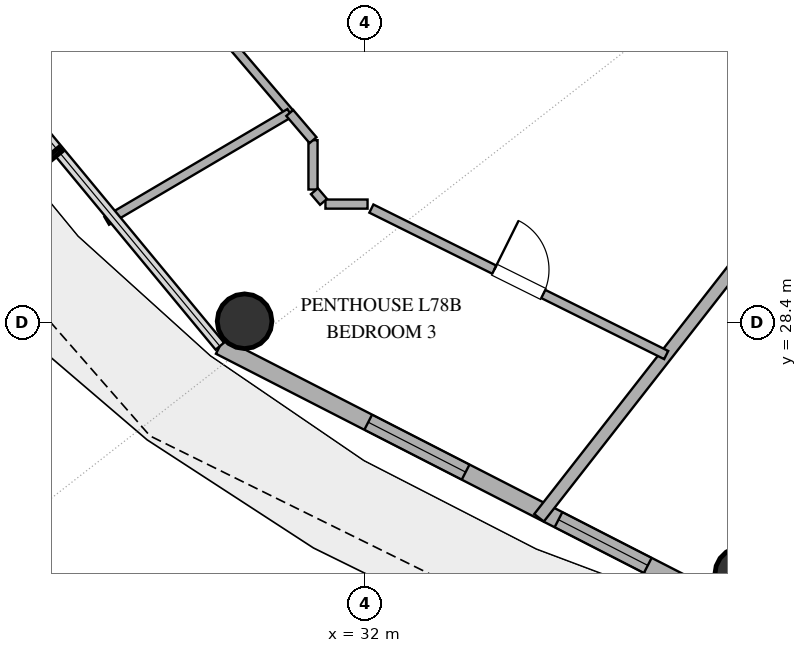
"""IFC4 building model, lengths in metres.
Left out: names, types, materials, properties, quantities, classifications, styles, units other than length and angle.
Written with IfcOpenShell. Run it as: python <this file> out.ifc"""

import sys

from ifc_helpers import new_model, si_unit, direction, frame, frame_2d, origin, origin_2d, place, context, subcontext, project, spatial, rectangle, hollow_circle, extrude, element, fill, save


model = new_model("IFC4")
c1 = context("Model", 3, precision=1e-05, world=origin(), true_north=direction((0.0, 1.0)))
c2 = subcontext(c1, "Body", "Model", "MODEL_VIEW")
j1 = project(units=[si_unit("LENGTHUNIT", "METRE"), si_unit("PLANEANGLEUNIT", "RADIAN")], contexts=[c1])
p1 = place(None, origin())
s1 = spatial("IfcSite", under=j1, at=p1, CompositionType="ELEMENT")
p2 = place(p1, origin())
s2 = spatial("IfcBuilding", under=s1, at=p2, CompositionType="ELEMENT")
p3 = place(p2, frame((0.0, 0.0, 301.8)))
s3 = spatial("IfcBuildingStorey", under=s2, at=p3, CompositionType="ELEMENT", Elevation=301.8)
for number, where, z_axis, x_axis in (
    (1, (30.025, 28.424, 0.0), (0.0, 0.0, 1.0), (1.0, 0.0, 0.0)),
    (2, (38.209, 24.261, 0.0), (0.0, 0.0, 1.0), (1.0, 0.0, 0.0)),
):
    element("IfcColumn", number, at=place(p3, frame(where, z_axis=z_axis, x_axis=x_axis)), inside=s3, PredefinedType="COLUMN", context=c2, shape_type="SweptSolid", body=[
        extrude(hollow_circle(Radius=0.45, WallThickness=0.025, at=origin_2d()), origin(), (0.0, 0.0, 1.0), 3.37),
    ])
p4 = place(p3, frame((29.617, 28.013, 0.0), z_axis=(0.0, 0.0, 1.0), x_axis=(0.890007394051, -0.455946091699, 0.0)))
e3 = element("IfcWall", 3, at=p4, inside=s3, PredefinedType="SOLIDWALL", context=c2, shape_type="SweptSolid", body=[
    extrude(rectangle(XDim=9.404, YDim=0.28, at=frame_2d((4.702, 0.0))), origin(), (0.0, 0.0, 1.0), 3.37),
])
p5 = place(p4, frame((2.742, 0.0, 0.85)))
e4 = element("IfcOpeningElement", 4, at=p5, cuts=e3, PredefinedType="OPENING", context=c2, shape_type="SweptSolid", body=[
    extrude(rectangle(XDim=1.8, YDim=2.2, at=frame_2d((0.9, 1.1))), frame((0.0, 0.15, 0.0), z_axis=(0.0, -1.0, 0.0), x_axis=(1.0, 0.0, 0.0)), (0.0, 0.0, 1.0), 0.3),
])
p6 = place(p4, frame((6.258, 0.0, 0.85)))
e5 = element("IfcOpeningElement", 5, at=p6, cuts=e3, PredefinedType="OPENING", context=c2, shape_type="SweptSolid", body=[
    extrude(rectangle(XDim=1.65, YDim=2.0, at=frame_2d((0.825, 1.0))), frame((0.0, 0.15, 0.0), z_axis=(0.0, -1.0, 0.0), x_axis=(1.0, 0.0, 0.0)), (0.0, 0.0, 1.0), 0.3),
])
p7 = place(p3, frame((42.687, 35.2, 0.0), z_axis=(0.0, 0.0, 1.0), x_axis=(-0.615663811723, -0.788008928208, 0.0)))
e6 = element("IfcWall", 6, at=p7, inside=s3, PredefinedType="PARTITIONING", context=c2, shape_type="SweptSolid", body=[
    extrude(rectangle(XDim=12.701, YDim=0.2, at=frame_2d((6.351, 0.0))), origin(), (0.0, 0.0, 1.0), 2.73),
])
p8 = place(p3, frame((32.11, 30.276, 0.0), z_axis=(0.0, 0.0, 1.0), x_axis=(0.895587674753, -0.444885060247, 0.0)))
e7 = element("IfcWall", 7, at=p8, inside=s3, PredefinedType="PARTITIONING", context=c2, shape_type="SweptSolid", body=[
    extrude(rectangle(XDim=5.414, YDim=0.15, at=frame_2d((2.707, 0.0))), origin(), (0.0, 0.0, 1.0), 2.73),
])
p9 = place(p8, frame((2.257, 0.0, 0.0)))
e8 = element("IfcOpeningElement", 8, at=p9, cuts=e7, PredefinedType="OPENING", context=c2, shape_type="SweptSolid", body=[
    extrude(rectangle(XDim=0.9, YDim=2.1, at=frame_2d((0.45, 1.05))), frame((0.0, 0.085, 0.0), z_axis=(0.0, -1.0, 0.0), x_axis=(1.0, 0.0, 0.0)), (0.0, 0.0, 1.0), 0.17),
])
p10 = place(p3, frame((27.519, 35.655, 0.0), z_axis=(0.0, 0.0, 1.0), x_axis=(0.649223146716, -0.760597992219, 0.0)))
e9 = element("IfcWall", 9, at=p10, inside=s3, PredefinedType="PARTITIONING", context=c2, shape_type="SweptSolid", body=[
    extrude(rectangle(XDim=5.004, YDim=0.14, at=frame_2d((2.502, 0.0))), origin(), (0.0, 0.0, 1.0), 2.73),
])
p11 = place(p10, frame((2.052, 0.0, 0.0)))
e10 = element("IfcOpeningElement", 10, at=p11, cuts=e9, PredefinedType="OPENING", context=c2, shape_type="SweptSolid", body=[
    extrude(rectangle(XDim=0.9, YDim=2.1, at=frame_2d((0.45, 1.05))), frame((0.0, 0.08, 0.0), z_axis=(0.0, -1.0, 0.0), x_axis=(1.0, 0.0, 0.0)), (0.0, 0.0, 1.0), 0.16),
])
p12 = place(p3, frame((30.768, 31.849, 0.0), z_axis=(0.0, 0.0, 1.0), x_axis=(-0.861632311911, -0.50753301279, 0.0)))
e11 = element("IfcWall", 11, at=p12, inside=s3, PredefinedType="PARTITIONING", context=c2, shape_type="SweptSolid", body=[
    extrude(rectangle(XDim=3.494, YDim=0.15, at=frame_2d((1.747, 0.0))), origin(), (0.0, 0.0, 1.0), 2.73),
])
p13 = place(p3, frame((31.15, 31.401, 0.0), z_axis=(0.0, 0.0, 1.0), x_axis=(0.0, -1.0, 0.0)))
e12 = element("IfcWall", 12, at=p13, inside=s3, PredefinedType="PARTITIONING", context=c2, shape_type="SweptSolid", body=[
    extrude(rectangle(XDim=0.812, YDim=0.15, at=frame_2d((0.406, 0.0))), origin(), (0.0, 0.0, 1.0), 2.73),
])
p14 = place(p3, frame((31.354, 30.35, 0.0), z_axis=(0.0, 0.0, 1.0), x_axis=(1.0, 0.0, 0.0)))
e13 = element("IfcWall", 13, at=p14, inside=s3, PredefinedType="PARTITIONING", context=c2, shape_type="SweptSolid", body=[
    extrude(rectangle(XDim=0.693, YDim=0.15, at=frame_2d((0.346, 0.0))), origin(), (0.0, 0.0, 1.0), 2.73),
])
p15 = place(p3, frame((30.768, 31.849, 0.0), z_axis=(0.0, 0.0, 1.0), x_axis=(0.649080846661, -0.760719432181, 0.0)))
e14 = element("IfcWall", 14, at=p15, inside=s3, PredefinedType="PARTITIONING", context=c2, shape_type="SweptSolid", body=[
    extrude(rectangle(XDim=0.588, YDim=0.15, at=frame_2d((0.294, 0.0))), origin(), (0.0, 0.0, 1.0), 2.73),
])
p16 = place(p3, frame((31.173, 30.562, 0.0), z_axis=(0.0, 0.0, 1.0), x_axis=(0.648874632887, -0.760895334981, 0.0)))
e15 = element("IfcWall", 15, at=p16, inside=s3, PredefinedType="PARTITIONING", context=c2, shape_type="SweptSolid", body=[
    extrude(rectangle(XDim=0.231, YDim=0.15, at=frame_2d((0.115, 0.0))), origin(), (0.0, 0.0, 1.0), 2.73),
])
p17 = place(p5, origin())
e16 = element("IfcWindow", 16, at=p17, inside=s3, PartitioningType="SINGLE_PANEL", PredefinedType="WINDOW", context=c2, shape_type="SweptSolid", body=[
    extrude(rectangle(XDim=1.8, YDim=2.2, at=frame_2d((0.9, 1.1))), frame((0.0, 0.03, 0.0), z_axis=(0.0, -1.0, 0.0), x_axis=(1.0, 0.0, 0.0)), (0.0, 0.0, 1.0), 0.06),
])
fill(e4, e16)
p18 = place(p6, origin())
e17 = element("IfcWindow", 17, at=p18, inside=s3, PartitioningType="SINGLE_PANEL", PredefinedType="WINDOW", context=c2, shape_type="SweptSolid", body=[
    extrude(rectangle(XDim=1.65, YDim=2.0, at=frame_2d((0.825, 1.0))), frame((0.0, 0.03, 0.0), z_axis=(0.0, -1.0, 0.0), x_axis=(1.0, 0.0, 0.0)), (0.0, 0.0, 1.0), 0.06),
])
fill(e5, e17)
p19 = place(p9, origin())
e18 = element("IfcDoor", 18, at=p19, inside=s3, OperationType="SINGLE_SWING_LEFT", PredefinedType="DOOR", context=c2, shape_type="SweptSolid", body=[
    extrude(rectangle(XDim=0.9, YDim=2.1, at=frame_2d((0.45, 1.05))), frame((0.0, 0.025, 0.0), z_axis=(0.0, -1.0, 0.0), x_axis=(1.0, 0.0, 0.0)), (0.0, 0.0, 1.0), 0.05),
])
fill(e8, e18)
save(model, sys.argv[1])
